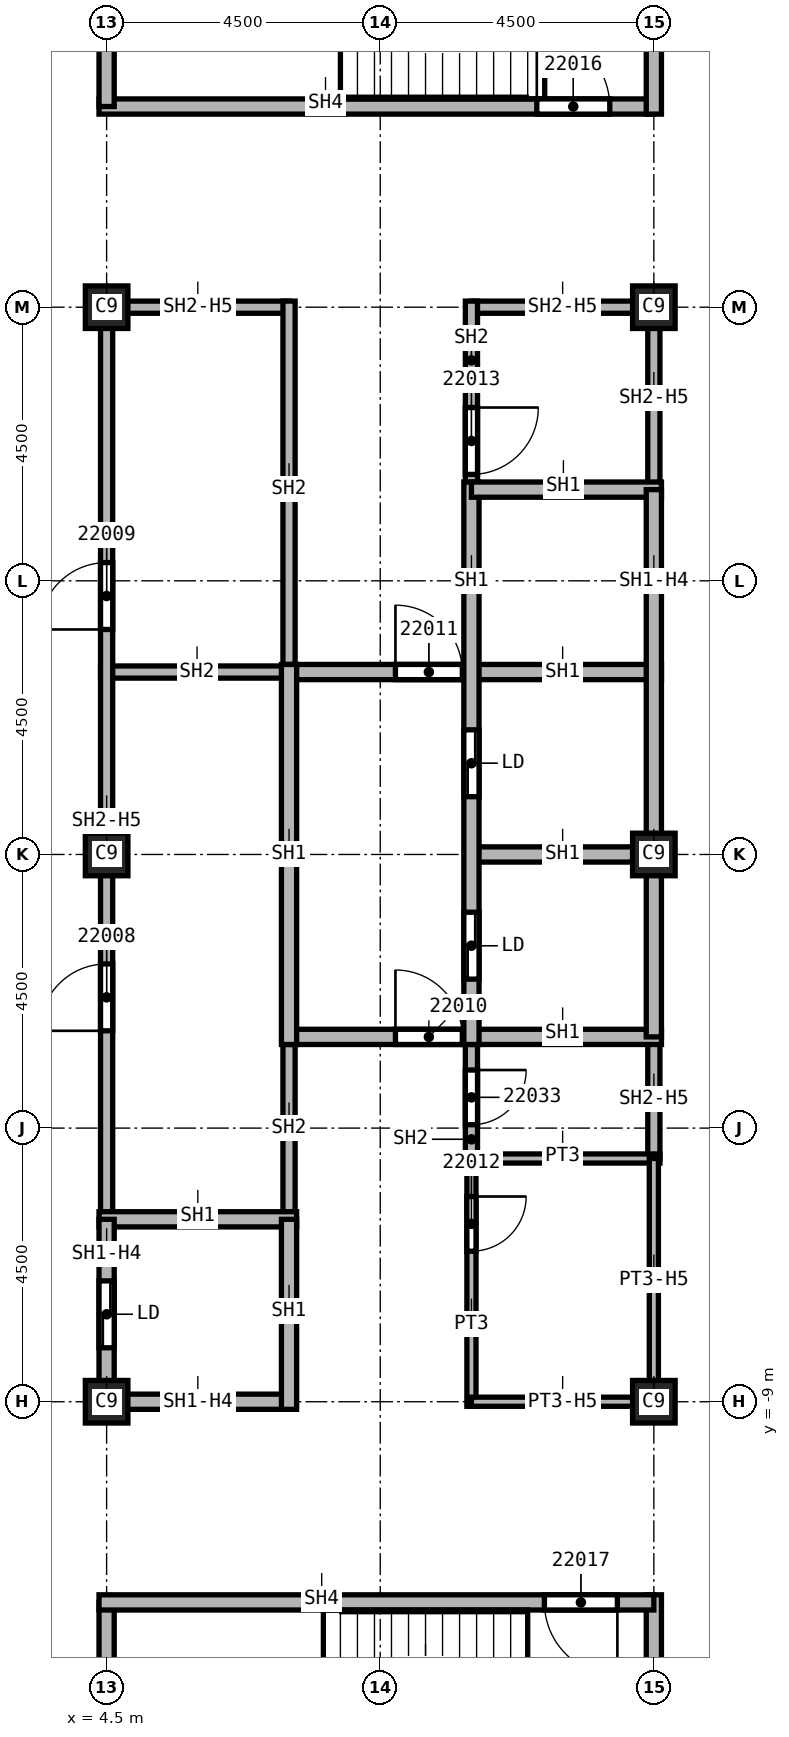
"""IFC4 building model, lengths in metres.
Left out: names, types, materials, properties, quantities, classifications, styles, units other than length and angle.
Written with IfcOpenShell. Run it as: python <this file> out.ifc"""

import sys

from ifc_helpers import new_model, si_unit, direction, frame, frame_2d, origin, origin_2d, place, context, subcontext, project, spatial, rectangle, extrude, element, fill, save


model = new_model("IFC4")
c1 = context("Model", 3, precision=1e-05, world=origin(), true_north=direction((0.0, 1.0)))
c2 = subcontext(c1, "Body", "Model", "MODEL_VIEW")
j1 = project(units=[si_unit("LENGTHUNIT", "METRE"), si_unit("PLANEANGLEUNIT", "RADIAN")], contexts=[c1])
p1 = place(None, origin())
s1 = spatial("IfcSite", under=j1, at=p1, CompositionType="ELEMENT")
p2 = place(p1, origin())
s2 = spatial("IfcBuilding", under=s1, at=p2, CompositionType="ELEMENT")
p3 = place(p2, frame((0.0, 0.0, 316.0)))
s3 = spatial("IfcBuildingStorey", under=s2, at=p3, CompositionType="ELEMENT", Elevation=316.0)
for number, where, z_axis, x_axis in (
    (1, (4.5, 0.0, 0.0), (0.0, 0.0, 1.0), (1.0, 0.0, 0.0)),
    (2, (4.5, 9.0, 0.0), (0.0, 0.0, 1.0), (1.0, 0.0, 0.0)),
    (3, (4.5, -9.0, 0.0), (0.0, 0.0, 1.0), (1.0, 0.0, 0.0)),
    (4, (13.5, 0.0, 0.0), (0.0, 0.0, 1.0), (1.0, 0.0, 0.0)),
    (5, (13.5, 9.0, 0.0), (0.0, 0.0, 1.0), (1.0, 0.0, 0.0)),
    (6, (13.5, -9.0, 0.0), (0.0, 0.0, 1.0), (1.0, 0.0, 0.0)),
):
    element("IfcColumn", number, at=place(p3, frame(where, z_axis=z_axis, x_axis=x_axis)), inside=s3, PredefinedType="COLUMN", context=c2, shape_type="SweptSolid", body=[
        extrude(rectangle(XDim=0.7, YDim=0.7, at=origin_2d()), origin(), (0.0, 0.0, 1.0), 3.59),
    ])
p4 = place(p3, frame((4.4, 3.0, 0.0), z_axis=(0.0, 0.0, 1.0), x_axis=(1.0, 0.0, 0.0)))
e7 = element("IfcWall", 7, at=p4, inside=s3, PredefinedType="SOLIDWALL", context=c2, shape_type="SweptSolid", body=[
    extrude(rectangle(XDim=3.225, YDim=0.2, at=frame_2d((1.613, 0.0))), origin(), (0.0, 0.0, 1.0), 3.59),
])
p5 = place(p3, frame((4.5, -6.0, 0.0), z_axis=(0.0, 0.0, 1.0), x_axis=(0.0, 1.0, 0.0)))
e8 = element("IfcWall", 8, at=p5, inside=s3, PredefinedType="SOLIDWALL", context=c2, shape_type="SweptSolid", body=[
    extrude(rectangle(XDim=15.1, YDim=0.2, at=frame_2d((7.55, 0.0))), origin(), (0.0, 0.0, 1.0), 2.828),
])
p6 = place(p5, frame((3.1, 0.0, 0.0)))
e9 = element("IfcOpeningElement", 9, at=p6, cuts=e8, PredefinedType="OPENING", context=c2, shape_type="SweptSolid", body=[
    extrude(rectangle(XDim=1.1, YDim=2.1, at=frame_2d((0.55, 1.05))), frame((0.0, 0.1, 0.0), z_axis=(0.0, -1.0, 0.0), x_axis=(1.0, 0.0, 0.0)), (0.0, 0.0, 1.0), 0.2),
])
p7 = place(p5, frame((9.7, 0.0, 0.0)))
e10 = element("IfcOpeningElement", 10, at=p7, cuts=e8, PredefinedType="OPENING", context=c2, shape_type="SweptSolid", body=[
    extrude(rectangle(XDim=1.1, YDim=2.1, at=frame_2d((0.55, 1.05))), frame((0.0, 0.1, 0.0), z_axis=(0.0, -1.0, 0.0), x_axis=(1.0, 0.0, 0.0)), (0.0, 0.0, 1.0), 0.2),
])
p8 = place(p3, frame((4.5, 9.0, 0.0), z_axis=(0.0, 0.0, 1.0), x_axis=(1.0, 0.0, 0.0)))
e11 = element("IfcWall", 11, at=p8, inside=s3, PredefinedType="SOLIDWALL", context=c2, shape_type="SweptSolid", body=[
    extrude(rectangle(XDim=3.0, YDim=0.2, at=frame_2d((1.5, 0.0))), origin(), (0.0, 0.0, 1.0), 2.828),
])
p9 = place(p3, frame((7.5, -2.875, 0.0), z_axis=(0.0, 0.0, 1.0), x_axis=(0.0, -1.0, 0.0)))
e12 = element("IfcWall", 12, at=p9, inside=s3, PredefinedType="SOLIDWALL", context=c2, shape_type="SweptSolid", body=[
    extrude(rectangle(XDim=3.125, YDim=0.2, at=frame_2d((1.562, 0.0))), origin(), (0.0, 0.0, 1.0), 3.59),
])
p10 = place(p3, frame((7.5, 9.1, 0.0), z_axis=(0.0, 0.0, 1.0), x_axis=(0.0, -1.0, 0.0)))
e13 = element("IfcWall", 13, at=p10, inside=s3, PredefinedType="SOLIDWALL", context=c2, shape_type="SweptSolid", body=[
    extrude(rectangle(XDim=6.225, YDim=0.2, at=frame_2d((3.113, 0.0))), origin(), (0.0, 0.0, 1.0), 3.59),
])
p11 = place(p3, frame((10.5, -2.875, 0.0), z_axis=(0.0, 0.0, 1.0), x_axis=(0.0, -1.0, 0.0)))
e14 = element("IfcWall", 14, at=p11, inside=s3, PredefinedType="SOLIDWALL", context=c2, shape_type="SweptSolid", body=[
    extrude(rectangle(XDim=2.2, YDim=0.2, at=frame_2d((1.1, 0.0))), origin(), (0.0, 0.0, 1.0), 3.59),
])
p12 = place(p11, frame((0.67, 0.0, 0.0)))
e15 = element("IfcOpeningElement", 15, at=p12, cuts=e14, PredefinedType="OPENING", context=c2, shape_type="SweptSolid", body=[
    extrude(rectangle(XDim=0.9, YDim=2.1, at=frame_2d((0.45, 1.05))), frame((0.0, 0.1, 0.0), z_axis=(0.0, -1.0, 0.0), x_axis=(1.0, 0.0, 0.0)), (0.0, 0.0, 1.0), 0.2),
])
p13 = place(p3, frame((10.5, 9.0, 0.0), z_axis=(0.0, 0.0, 1.0), x_axis=(1.0, 0.0, 0.0)))
e16 = element("IfcWall", 16, at=p13, inside=s3, PredefinedType="SOLIDWALL", context=c2, shape_type="SweptSolid", body=[
    extrude(rectangle(XDim=3.0, YDim=0.2, at=frame_2d((1.5, 0.0))), origin(), (0.0, 0.0, 1.0), 2.828),
])
p14 = place(p3, frame((10.5, 9.1, 0.0), z_axis=(0.0, 0.0, 1.0), x_axis=(0.0, -1.0, 0.0)))
e17 = element("IfcWall", 17, at=p14, inside=s3, PredefinedType="SOLIDWALL", context=c2, shape_type="SweptSolid", body=[
    extrude(rectangle(XDim=3.225, YDim=0.2, at=frame_2d((1.613, 0.0))), origin(), (0.0, 0.0, 1.0), 3.59),
])
p15 = place(p14, frame((1.75, 0.0, 0.0)))
e18 = element("IfcOpeningElement", 18, at=p15, cuts=e17, PredefinedType="OPENING", context=c2, shape_type="SweptSolid", body=[
    extrude(rectangle(XDim=1.1, YDim=2.1, at=frame_2d((0.55, 1.05))), frame((0.0, 0.1, 0.0), z_axis=(0.0, -1.0, 0.0), x_axis=(1.0, 0.0, 0.0)), (0.0, 0.0, 1.0), 0.2),
])
p16 = place(p3, frame((13.5, -3.0, 0.0), z_axis=(0.0, 0.0, 1.0), x_axis=(0.0, -1.0, 0.0)))
e19 = element("IfcWall", 19, at=p16, inside=s3, PredefinedType="SOLIDWALL", context=c2, shape_type="SweptSolid", body=[
    extrude(rectangle(XDim=2.0, YDim=0.2, at=frame_2d((1.0, 0.0))), origin(), (0.0, 0.0, 1.0), 2.828),
])
p17 = place(p3, frame((13.5, 9.1, 0.0), z_axis=(0.0, 0.0, 1.0), x_axis=(0.0, -1.0, 0.0)))
e20 = element("IfcWall", 20, at=p17, inside=s3, PredefinedType="SOLIDWALL", context=c2, shape_type="SweptSolid", body=[
    extrude(rectangle(XDim=3.1, YDim=0.2, at=frame_2d((1.55, 0.0))), origin(), (0.0, 0.0, 1.0), 2.828),
])
p18 = place(p3, frame((4.375, -6.0, 0.0), z_axis=(0.0, 0.0, 1.0), x_axis=(1.0, 0.0, 0.0)))
e21 = element("IfcWall", 21, at=p18, inside=s3, PredefinedType="SOLIDWALL", context=c2, shape_type="SweptSolid", body=[
    extrude(rectangle(XDim=3.25, YDim=0.25, at=frame_2d((1.625, 0.0))), origin(), (0.0, 0.0, 1.0), 3.59),
])
p19 = place(p3, frame((4.5, -9.125, 0.0), z_axis=(0.0, 0.0, 1.0), x_axis=(0.0, 1.0, 0.0)))
e22 = element("IfcWall", 22, at=p19, inside=s3, PredefinedType="SOLIDWALL", context=c2, shape_type="SweptSolid", body=[
    extrude(rectangle(XDim=3.125, YDim=0.25, at=frame_2d((1.562, 0.0))), origin(), (0.0, 0.0, 1.0), 2.828),
])
p20 = place(p19, frame((1.012, 0.0, 0.0)))
e23 = element("IfcOpeningElement", 23, at=p20, cuts=e22, PredefinedType="OPENING", context=c2, shape_type="SweptSolid", body=[
    extrude(rectangle(XDim=1.1, YDim=2.1, at=frame_2d((0.55, 1.05))), frame((0.0, 0.125, 0.0), z_axis=(0.0, -1.0, 0.0), x_axis=(1.0, 0.0, 0.0)), (0.0, 0.0, 1.0), 0.25),
])
p21 = place(p3, frame((7.5, -9.0, 0.0), z_axis=(0.0, 0.0, 1.0), x_axis=(-1.0, 0.0, 0.0)))
e24 = element("IfcWall", 24, at=p21, inside=s3, PredefinedType="SOLIDWALL", context=c2, shape_type="SweptSolid", body=[
    extrude(rectangle(XDim=3.0, YDim=0.25, at=frame_2d((1.5, 0.0))), origin(), (0.0, 0.0, 1.0), 2.828),
])
p22 = place(p3, frame((7.5, -6.0, 0.0), z_axis=(0.0, 0.0, 1.0), x_axis=(0.0, -1.0, 0.0)))
e25 = element("IfcWall", 25, at=p22, inside=s3, PredefinedType="SOLIDWALL", context=c2, shape_type="SweptSolid", body=[
    extrude(rectangle(XDim=3.125, YDim=0.25, at=frame_2d((1.562, 0.0))), origin(), (0.0, 0.0, 1.0), 3.59),
])
p23 = place(p3, frame((7.5, -3.0, 0.0), z_axis=(0.0, 0.0, 1.0), x_axis=(1.0, 0.0, 0.0)))
e26 = element("IfcWall", 26, at=p23, inside=s3, PredefinedType="SOLIDWALL", context=c2, shape_type="SweptSolid", body=[
    extrude(rectangle(XDim=6.125, YDim=0.25, at=frame_2d((3.062, 0.0))), origin(), (0.0, 0.0, 1.0), 3.59),
])
p24 = place(p23, frame((1.75, 0.0, 0.0)))
e27 = element("IfcOpeningElement", 27, at=p24, cuts=e26, PredefinedType="OPENING", context=c2, shape_type="SweptSolid", body=[
    extrude(rectangle(XDim=1.1, YDim=2.1, at=frame_2d((0.55, 1.05))), frame((0.0, 0.125, 0.0), z_axis=(0.0, -1.0, 0.0), x_axis=(1.0, 0.0, 0.0)), (0.0, 0.0, 1.0), 0.25),
])
p25 = place(p3, frame((7.5, 3.0, 0.0), z_axis=(0.0, 0.0, 1.0), x_axis=(1.0, 0.0, 0.0)))
e28 = element("IfcWall", 28, at=p25, inside=s3, PredefinedType="SOLIDWALL", context=c2, shape_type="SweptSolid", body=[
    extrude(rectangle(XDim=6.125, YDim=0.25, at=frame_2d((3.062, 0.0))), origin(), (0.0, 0.0, 1.0), 3.59),
])
p26 = place(p25, frame((1.75, 0.0, 0.0)))
e29 = element("IfcOpeningElement", 29, at=p26, cuts=e28, PredefinedType="OPENING", context=c2, shape_type="SweptSolid", body=[
    extrude(rectangle(XDim=1.1, YDim=2.1, at=frame_2d((0.55, 1.05))), frame((0.0, 0.125, 0.0), z_axis=(0.0, -1.0, 0.0), x_axis=(1.0, 0.0, 0.0)), (0.0, 0.0, 1.0), 0.25),
])
p27 = place(p3, frame((7.5, 3.125, 0.0), z_axis=(0.0, 0.0, 1.0), x_axis=(0.0, -1.0, 0.0)))
e30 = element("IfcWall", 30, at=p27, inside=s3, PredefinedType="SOLIDWALL", context=c2, shape_type="SweptSolid", body=[
    extrude(rectangle(XDim=6.25, YDim=0.25, at=frame_2d((3.125, 0.0))), origin(), (0.0, 0.0, 1.0), 3.59),
])
p28 = place(p3, frame((10.5, 0.0, 0.0), z_axis=(0.0, 0.0, 1.0), x_axis=(1.0, 0.0, 0.0)))
e31 = element("IfcWall", 31, at=p28, inside=s3, PredefinedType="SOLIDWALL", context=c2, shape_type="SweptSolid", body=[
    extrude(rectangle(XDim=3.125, YDim=0.25, at=frame_2d((1.562, 0.0))), origin(), (0.0, 0.0, 1.0), 3.59),
])
p29 = place(p3, frame((10.5, 6.125, 0.0), z_axis=(0.0, 0.0, 1.0), x_axis=(0.0, -1.0, 0.0)))
e32 = element("IfcWall", 32, at=p29, inside=s3, PredefinedType="SOLIDWALL", context=c2, shape_type="SweptSolid", body=[
    extrude(rectangle(XDim=9.25, YDim=0.25, at=frame_2d((4.625, 0.0))), origin(), (0.0, 0.0, 1.0), 3.59),
])
p30 = place(p29, frame((7.075, 0.0, 0.0)))
e33 = element("IfcOpeningElement", 33, at=p30, cuts=e32, PredefinedType="OPENING", context=c2, shape_type="SweptSolid", body=[
    extrude(rectangle(XDim=1.1, YDim=2.1, at=frame_2d((0.55, 1.05))), frame((0.0, 0.125, 0.0), z_axis=(0.0, -1.0, 0.0), x_axis=(1.0, 0.0, 0.0)), (0.0, 0.0, 1.0), 0.25),
])
p31 = place(p29, frame((4.075, 0.0, 0.0)))
e34 = element("IfcOpeningElement", 34, at=p31, cuts=e32, PredefinedType="OPENING", context=c2, shape_type="SweptSolid", body=[
    extrude(rectangle(XDim=1.1, YDim=2.1, at=frame_2d((0.55, 1.05))), frame((0.0, 0.125, 0.0), z_axis=(0.0, -1.0, 0.0), x_axis=(1.0, 0.0, 0.0)), (0.0, 0.0, 1.0), 0.25),
])
p32 = place(p3, frame((10.5, 6.0, 0.0), z_axis=(0.0, 0.0, 1.0), x_axis=(1.0, 0.0, 0.0)))
e35 = element("IfcWall", 35, at=p32, inside=s3, PredefinedType="SOLIDWALL", context=c2, shape_type="SweptSolid", body=[
    extrude(rectangle(XDim=3.125, YDim=0.25, at=frame_2d((1.562, 0.0))), origin(), (0.0, 0.0, 1.0), 3.59),
])
p33 = place(p3, frame((13.5, 6.0, 0.0), z_axis=(0.0, 0.0, 1.0), x_axis=(0.0, -1.0, 0.0)))
e36 = element("IfcWall", 36, at=p33, inside=s3, PredefinedType="SOLIDWALL", context=c2, shape_type="SweptSolid", body=[
    extrude(rectangle(XDim=9.0, YDim=0.25, at=frame_2d((4.5, 0.0))), origin(), (0.0, 0.0, 1.0), 2.828),
])
p34 = place(p3, frame((4.375, 12.3, 0.0), z_axis=(0.0, 0.0, 1.0), x_axis=(1.0, 0.0, 0.0)))
e37 = element("IfcWall", 37, at=p34, inside=s3, PredefinedType="SOLIDWALL", context=c2, shape_type="SweptSolid", body=[
    extrude(rectangle(XDim=9.125, YDim=0.25, at=frame_2d((4.562, 0.0))), origin(), (0.0, 0.0, 1.0), 3.59),
])
p35 = place(p34, frame((7.2, 0.0, 0.0)))
e38 = element("IfcOpeningElement", 38, at=p35, cuts=e37, PredefinedType="OPENING", context=c2, shape_type="SweptSolid", body=[
    extrude(rectangle(XDim=1.2, YDim=2.1, at=frame_2d((0.6, 1.05))), frame((0.0, 0.125, 0.0), z_axis=(0.0, -1.0, 0.0), x_axis=(1.0, 0.0, 0.0)), (0.0, 0.0, 1.0), 0.25),
])
for number, where, z_axis, x_axis in (
    (39, (4.5, -16.8, 0.0), (0.0, 0.0, 1.0), (0.0, 1.0, 0.0)),
    (40, (4.5, 12.3, 0.0), (0.0, 0.0, 1.0), (0.0, 1.0, 0.0)),
):
    element("IfcWall", number, at=place(p3, frame(where, z_axis=z_axis, x_axis=x_axis)), inside=s3, PredefinedType="SOLIDWALL", context=c2, shape_type="SweptSolid", body=[
        extrude(rectangle(XDim=4.5, YDim=0.25, at=frame_2d((2.25, 0.0))), origin(), (0.0, 0.0, 1.0), 3.59),
    ])
p36 = place(p3, frame((13.5, -16.925, 0.0), z_axis=(0.0, 0.0, 1.0), x_axis=(0.0, 1.0, 0.0)))
e41 = element("IfcWall", 41, at=p36, inside=s3, PredefinedType="SOLIDWALL", context=c2, shape_type="SweptSolid", body=[
    extrude(rectangle(XDim=4.75, YDim=0.25, at=frame_2d((2.375, 0.0))), origin(), (0.0, 0.0, 1.0), 3.59),
])
p37 = place(p3, frame((13.5, -12.3, 0.0), z_axis=(0.0, 0.0, 1.0), x_axis=(-1.0, 0.0, 0.0)))
e42 = element("IfcWall", 42, at=p37, inside=s3, PredefinedType="SOLIDWALL", context=c2, shape_type="SweptSolid", body=[
    extrude(rectangle(XDim=9.125, YDim=0.25, at=frame_2d((4.562, 0.0))), origin(), (0.0, 0.0, 1.0), 3.59),
])
p38 = place(p37, frame((0.6, 0.0, 0.0)))
e43 = element("IfcOpeningElement", 43, at=p38, cuts=e42, PredefinedType="OPENING", context=c2, shape_type="SweptSolid", body=[
    extrude(rectangle(XDim=1.2, YDim=2.1, at=frame_2d((0.6, 1.05))), frame((0.0, 0.125, 0.0), z_axis=(0.0, -1.0, 0.0), x_axis=(1.0, 0.0, 0.0)), (0.0, 0.0, 1.0), 0.25),
])
p39 = place(p3, frame((13.5, 12.175, 0.0), z_axis=(0.0, 0.0, 1.0), x_axis=(0.0, 1.0, 0.0)))
e44 = element("IfcWall", 44, at=p39, inside=s3, PredefinedType="SOLIDWALL", context=c2, shape_type="SweptSolid", body=[
    extrude(rectangle(XDim=4.75, YDim=0.25, at=frame_2d((2.375, 0.0))), origin(), (0.0, 0.0, 1.0), 3.59),
])
p40 = place(p3, frame((10.5, -5.0, 0.0), z_axis=(0.0, 0.0, 1.0), x_axis=(1.0, 0.0, 0.0)))
e45 = element("IfcWall", 45, at=p40, inside=s3, PredefinedType="PARTITIONING", context=c2, shape_type="SweptSolid", body=[
    extrude(rectangle(XDim=3.1, YDim=0.15, at=frame_2d((1.55, 0.0))), origin(), (0.0, 0.0, 1.0), 3.59),
])
p41 = place(p3, frame((10.5, -4.925, 0.0), z_axis=(0.0, 0.0, 1.0), x_axis=(0.0, -1.0, 0.0)))
e46 = element("IfcWall", 46, at=p41, inside=s3, PredefinedType="PARTITIONING", context=c2, shape_type="SweptSolid", body=[
    extrude(rectangle(XDim=4.15, YDim=0.15, at=frame_2d((2.075, 0.0))), origin(), (0.0, 0.0, 1.0), 3.59),
])
p42 = place(p41, frame((0.7, 0.0, 0.0)))
e47 = element("IfcOpeningElement", 47, at=p42, cuts=e46, PredefinedType="OPENING", context=c2, shape_type="SweptSolid", body=[
    extrude(rectangle(XDim=0.9, YDim=2.1, at=frame_2d((0.45, 1.05))), frame((0.0, 0.075, 0.0), z_axis=(0.0, -1.0, 0.0), x_axis=(1.0, 0.0, 0.0)), (0.0, 0.0, 1.0), 0.15),
])
p43 = place(p3, frame((13.5, -9.0, 0.0), z_axis=(0.0, 0.0, 1.0), x_axis=(-1.0, 0.0, 0.0)))
e48 = element("IfcWall", 48, at=p43, inside=s3, PredefinedType="PARTITIONING", context=c2, shape_type="SweptSolid", body=[
    extrude(rectangle(XDim=3.0, YDim=0.15, at=frame_2d((1.5, 0.0))), origin(), (0.0, 0.0, 1.0), 2.828),
])
p44 = place(p3, frame((13.5, -5.0, 0.0), z_axis=(0.0, 0.0, 1.0), x_axis=(0.0, -1.0, 0.0)))
e49 = element("IfcWall", 49, at=p44, inside=s3, PredefinedType="PARTITIONING", context=c2, shape_type="SweptSolid", body=[
    extrude(rectangle(XDim=4.075, YDim=0.15, at=frame_2d((2.038, 0.0))), origin(), (0.0, 0.0, 1.0), 2.828),
])
p45 = place(p6, origin())
e50 = element("IfcDoor", 50, at=p45, inside=s3, OperationType="SINGLE_SWING_LEFT", PredefinedType="DOOR", context=c2, shape_type="SweptSolid", body=[
    extrude(rectangle(XDim=1.1, YDim=2.1, at=frame_2d((0.55, 1.05))), frame((0.0, 0.025, 0.0), z_axis=(0.0, -1.0, 0.0), x_axis=(1.0, 0.0, 0.0)), (0.0, 0.0, 1.0), 0.05),
])
fill(e9, e50)
p46 = place(p7, origin())
e51 = element("IfcDoor", 51, at=p46, inside=s3, OperationType="SINGLE_SWING_RIGHT", PredefinedType="DOOR", context=c2, shape_type="SweptSolid", body=[
    extrude(rectangle(XDim=1.1, YDim=2.1, at=frame_2d((0.55, 1.05))), frame((0.0, 0.025, 0.0), z_axis=(0.0, -1.0, 0.0), x_axis=(1.0, 0.0, 0.0)), (0.0, 0.0, 1.0), 0.05),
])
fill(e10, e51)
p47 = place(p24, origin())
e52 = element("IfcDoor", 52, at=p47, inside=s3, OperationType="SINGLE_SWING_LEFT", PredefinedType="DOOR", context=c2, shape_type="SweptSolid", body=[
    extrude(rectangle(XDim=1.1, YDim=2.1, at=frame_2d((0.55, 1.05))), frame((0.0, 0.025, 0.0), z_axis=(0.0, -1.0, 0.0), x_axis=(1.0, 0.0, 0.0)), (0.0, 0.0, 1.0), 0.05),
])
fill(e27, e52)
p48 = place(p26, origin())
e53 = element("IfcDoor", 53, at=p48, inside=s3, OperationType="SINGLE_SWING_RIGHT", PredefinedType="DOOR", context=c2, shape_type="SweptSolid", body=[
    extrude(rectangle(XDim=1.1, YDim=2.1, at=frame_2d((0.55, 1.05))), frame((0.0, 0.025, 0.0), z_axis=(0.0, -1.0, 0.0), x_axis=(1.0, 0.0, 0.0)), (0.0, 0.0, 1.0), 0.05),
])
fill(e29, e53)
p49 = place(p42, origin())
e54 = element("IfcDoor", 54, at=p49, inside=s3, OperationType="SINGLE_SWING_LEFT", PredefinedType="DOOR", context=c2, shape_type="SweptSolid", body=[
    extrude(rectangle(XDim=0.9, YDim=2.1, at=frame_2d((0.45, 1.05))), frame((0.0, 0.025, 0.0), z_axis=(0.0, -1.0, 0.0), x_axis=(1.0, 0.0, 0.0)), (0.0, 0.0, 1.0), 0.05),
])
fill(e47, e54)
p50 = place(p15, origin())
e55 = element("IfcDoor", 55, at=p50, inside=s3, OperationType="SINGLE_SWING_RIGHT", PredefinedType="DOOR", context=c2, shape_type="SweptSolid", body=[
    extrude(rectangle(XDim=1.1, YDim=2.1, at=frame_2d((0.55, 1.05))), frame((0.0, 0.025, 0.0), z_axis=(0.0, -1.0, 0.0), x_axis=(1.0, 0.0, 0.0)), (0.0, 0.0, 1.0), 0.05),
])
fill(e18, e55)
p51 = place(p35, origin())
e56 = element("IfcDoor", 56, at=p51, inside=s3, OperationType="SINGLE_SWING_LEFT", PredefinedType="DOOR", context=c2, shape_type="SweptSolid", body=[
    extrude(rectangle(XDim=1.2, YDim=2.1, at=frame_2d((0.6, 1.05))), frame((0.0, 0.025, 0.0), z_axis=(0.0, -1.0, 0.0), x_axis=(1.0, 0.0, 0.0)), (0.0, 0.0, 1.0), 0.05),
])
fill(e38, e56)
p52 = place(p38, origin())
e57 = element("IfcDoor", 57, at=p52, inside=s3, OperationType="SINGLE_SWING_RIGHT", PredefinedType="DOOR", context=c2, shape_type="SweptSolid", body=[
    extrude(rectangle(XDim=1.2, YDim=2.1, at=frame_2d((0.6, 1.05))), frame((0.0, 0.025, 0.0), z_axis=(0.0, -1.0, 0.0), x_axis=(1.0, 0.0, 0.0)), (0.0, 0.0, 1.0), 0.05),
])
fill(e43, e57)
p53 = place(p12, origin())
e58 = element("IfcDoor", 58, at=p53, inside=s3, OperationType="SINGLE_SWING_LEFT", PredefinedType="DOOR", context=c2, shape_type="SweptSolid", body=[
    extrude(rectangle(XDim=0.9, YDim=2.1, at=frame_2d((0.45, 1.05))), frame((0.0, 0.025, 0.0), z_axis=(0.0, -1.0, 0.0), x_axis=(1.0, 0.0, 0.0)), (0.0, 0.0, 1.0), 0.05),
])
fill(e15, e58)
p54 = place(p20, origin())
e59 = element("IfcDoor", 59, at=p54, inside=s3, OperationType="SLIDING_TO_LEFT", PredefinedType="DOOR", context=c2, shape_type="SweptSolid", body=[
    extrude(rectangle(XDim=1.1, YDim=2.1, at=frame_2d((0.55, 1.05))), frame((0.0, 0.025, 0.0), z_axis=(0.0, -1.0, 0.0), x_axis=(1.0, 0.0, 0.0)), (0.0, 0.0, 1.0), 0.05),
])
fill(e23, e59)
p55 = place(p30, origin())
e60 = element("IfcDoor", 60, at=p55, inside=s3, OperationType="SLIDING_TO_LEFT", PredefinedType="DOOR", context=c2, shape_type="SweptSolid", body=[
    extrude(rectangle(XDim=1.1, YDim=2.1, at=frame_2d((0.55, 1.05))), frame((0.0, 0.025, 0.0), z_axis=(0.0, -1.0, 0.0), x_axis=(1.0, 0.0, 0.0)), (0.0, 0.0, 1.0), 0.05),
])
fill(e33, e60)
p56 = place(p31, origin())
e61 = element("IfcDoor", 61, at=p56, inside=s3, OperationType="SLIDING_TO_LEFT", PredefinedType="DOOR", context=c2, shape_type="SweptSolid", body=[
    extrude(rectangle(XDim=1.1, YDim=2.1, at=frame_2d((0.55, 1.05))), frame((0.0, 0.025, 0.0), z_axis=(0.0, -1.0, 0.0), x_axis=(1.0, 0.0, 0.0)), (0.0, 0.0, 1.0), 0.05),
])
fill(e34, e61)
save(model, sys.argv[1])
